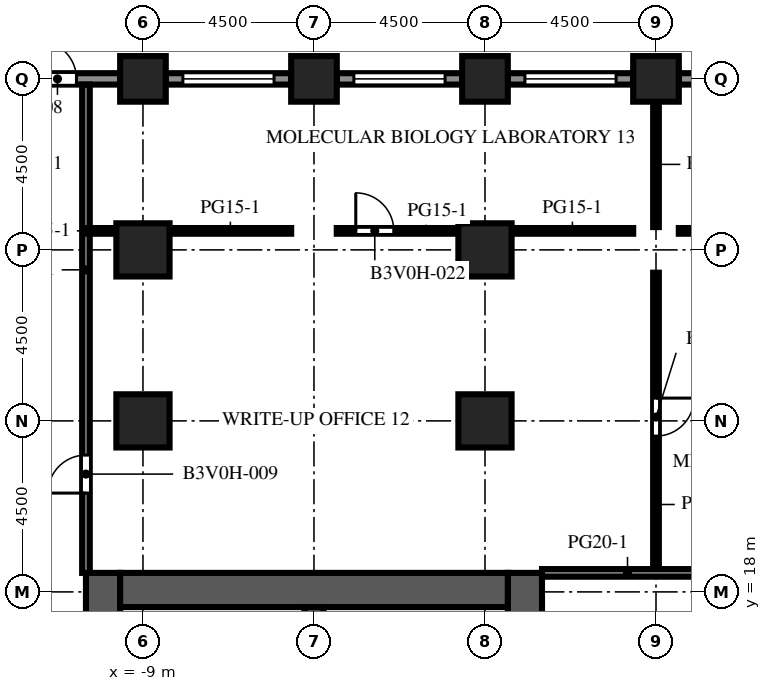
"""IFC4 building model, lengths in metres.
Left out: names, types, materials, properties, quantities, classifications, styles, units other than length and angle.
Written with IfcOpenShell. Run it as: python <this file> out.ifc"""

import sys

from ifc_helpers import new_model, si_unit, direction, frame, frame_2d, origin, origin_2d, place, context, subcontext, project, spatial, rectangle, extrude, element, fill, save


model = new_model("IFC4")
c1 = context("Model", 3, precision=1e-05, world=origin(), true_north=direction((0.0, 1.0)))
c2 = subcontext(c1, "Body", "Model", "MODEL_VIEW")
j1 = project(units=[si_unit("LENGTHUNIT", "METRE"), si_unit("PLANEANGLEUNIT", "RADIAN")], contexts=[c1])
p1 = place(None, origin())
s1 = spatial("IfcSite", under=j1, at=p1, CompositionType="ELEMENT")
p2 = place(p1, origin())
s2 = spatial("IfcBuilding", under=s1, at=p2, CompositionType="ELEMENT")
p3 = place(p2, frame((0.0, 0.0, 82.0)))
s3 = spatial("IfcBuildingStorey", under=s2, at=p3, CompositionType="ELEMENT", Elevation=82.0)
for number, where, z_axis, x_axis in (
    (1, (-9.0, 31.5, -0.45), (0.0, 0.0, 1.0), (1.0, 0.0, 0.0)),
    (2, (-4.5, 31.5, -0.45), (0.0, 0.0, 1.0), (1.0, 0.0, 0.0)),
    (3, (0.0, 31.5, -0.45), (0.0, 0.0, 1.0), (1.0, 0.0, 0.0)),
    (4, (4.5, 31.5, -0.45), (0.0, 0.0, 1.0), (1.0, 0.0, 0.0)),
):
    element("IfcColumn", number, at=place(p3, frame(where, z_axis=z_axis, x_axis=x_axis)), inside=s3, PredefinedType="COLUMN", context=c2, shape_type="SweptSolid", body=[
        extrude(rectangle(XDim=1.2, YDim=1.2, at=origin_2d()), origin(), (0.0, 0.0, 1.0), 4.55),
    ])
for number, where, z_axis, x_axis in (
    (5, (-9.0, 22.5, -0.45), (0.0, 0.0, 1.0), (1.0, 0.0, 0.0)),
    (6, (-9.0, 27.0, -0.45), (0.0, 0.0, 1.0), (1.0, 0.0, 0.0)),
    (7, (0.0, 22.5, -0.45), (0.0, 0.0, 1.0), (1.0, 0.0, 0.0)),
    (8, (0.0, 27.0, -0.45), (0.0, 0.0, 1.0), (1.0, 0.0, 0.0)),
):
    element("IfcColumn", number, at=place(p3, frame(where, z_axis=z_axis, x_axis=x_axis)), inside=s3, PredefinedType="COLUMN", context=c2, shape_type="SweptSolid", body=[
        extrude(rectangle(XDim=1.4, YDim=1.4, at=origin_2d()), origin(), (0.0, 0.0, 1.0), 4.55),
    ])
p4 = place(p3, frame((-10.05, -9.0, 0.0), z_axis=(0.0, 0.0, 1.0), x_axis=(0.0, 1.0, 0.0)))
e9 = element("IfcWall", 9, at=p4, inside=s3, PredefinedType="SHEAR", context=c2, shape_type="SweptSolid", body=[
    extrude(rectangle(XDim=27.5, YDim=0.9, at=frame_2d((13.75, 0.0))), origin(), (0.0, 0.0, 1.0), 4.1),
])
p5 = place(p4, frame((12.55, 0.0, 0.0)))
e10 = element("IfcOpeningElement", 10, at=p5, cuts=e9, PredefinedType="OPENING", context=c2, shape_type="SweptSolid", body=[
    extrude(rectangle(XDim=2.4, YDim=2.4, at=frame_2d((1.2, 1.2))), frame((0.0, 0.46, 0.0), z_axis=(0.0, -1.0, 0.0), x_axis=(1.0, 0.0, 0.0)), (0.0, 0.0, 1.0), 0.92),
])
p6 = place(p4, frame((6.825, 0.0, 0.0)))
e11 = element("IfcOpeningElement", 11, at=p6, cuts=e9, PredefinedType="OPENING", context=c2, shape_type="SweptSolid", body=[
    extrude(rectangle(XDim=1.2, YDim=2.1, at=frame_2d((0.6, 1.05))), frame((0.0, 0.46, 0.0), z_axis=(0.0, -1.0, 0.0), x_axis=(1.0, 0.0, 0.0)), (0.0, 0.0, 1.0), 0.92),
])
p7 = place(p4, frame((19.475, 0.0, 0.0)))
e12 = element("IfcOpeningElement", 12, at=p7, cuts=e9, PredefinedType="OPENING", context=c2, shape_type="SweptSolid", body=[
    extrude(rectangle(XDim=1.2, YDim=2.1, at=frame_2d((0.6, 1.05))), frame((0.0, 0.46, 0.0), z_axis=(0.0, -1.0, 0.0), x_axis=(1.0, 0.0, 0.0)), (0.0, 0.0, 1.0), 0.92),
])
p8 = place(p3, frame((1.05, -9.0, 0.0), z_axis=(0.0, 0.0, 1.0), x_axis=(0.0, 1.0, 0.0)))
e13 = element("IfcWall", 13, at=p8, inside=s3, PredefinedType="SHEAR", context=c2, shape_type="SweptSolid", body=[
    extrude(rectangle(XDim=27.5, YDim=0.9, at=frame_2d((13.75, 0.0))), origin(), (0.0, 0.0, 1.0), 4.1),
])
p9 = place(p8, frame((12.55, 0.0, 0.0)))
e14 = element("IfcOpeningElement", 14, at=p9, cuts=e13, PredefinedType="OPENING", context=c2, shape_type="SweptSolid", body=[
    extrude(rectangle(XDim=2.4, YDim=2.4, at=frame_2d((1.2, 1.2))), frame((0.0, 0.46, 0.0), z_axis=(0.0, -1.0, 0.0), x_axis=(1.0, 0.0, 0.0)), (0.0, 0.0, 1.0), 0.92),
])
p10 = place(p8, frame((5.445, 0.0, 0.0)))
e15 = element("IfcOpeningElement", 15, at=p10, cuts=e13, PredefinedType="OPENING", context=c2, shape_type="SweptSolid", body=[
    extrude(rectangle(XDim=1.2, YDim=2.1, at=frame_2d((0.6, 1.05))), frame((0.0, 0.46, 0.0), z_axis=(0.0, -1.0, 0.0), x_axis=(1.0, 0.0, 0.0)), (0.0, 0.0, 1.0), 0.92),
])
p11 = place(p8, frame((19.485, 0.0, 0.0)))
e16 = element("IfcOpeningElement", 16, at=p11, cuts=e13, PredefinedType="OPENING", context=c2, shape_type="SweptSolid", body=[
    extrude(rectangle(XDim=1.0, YDim=2.1, at=frame_2d((0.5, 1.05))), frame((0.0, 0.46, 0.0), z_axis=(0.0, -1.0, 0.0), x_axis=(1.0, 0.0, 0.0)), (0.0, 0.0, 1.0), 0.92),
])
p12 = place(p8, frame((21.139, 0.0, 0.0)))
e17 = element("IfcOpeningElement", 17, at=p12, cuts=e13, PredefinedType="OPENING", context=c2, shape_type="SweptSolid", body=[
    extrude(rectangle(XDim=1.0, YDim=2.1, at=frame_2d((0.5, 1.05))), frame((0.0, 0.46, 0.0), z_axis=(0.0, -1.0, 0.0), x_axis=(1.0, 0.0, 0.0)), (0.0, 0.0, 1.0), 0.92),
])
p13 = place(p8, frame((23.16, 0.0, 0.0)))
e18 = element("IfcOpeningElement", 18, at=p13, cuts=e13, PredefinedType="OPENING", context=c2, shape_type="SweptSolid", body=[
    extrude(rectangle(XDim=1.0, YDim=2.1, at=frame_2d((0.5, 1.05))), frame((0.0, 0.46, 0.0), z_axis=(0.0, -1.0, 0.0), x_axis=(1.0, 0.0, 0.0)), (0.0, 0.0, 1.0), 0.92),
])
p14 = place(p8, frame((25.181, 0.0, 0.0)))
e19 = element("IfcOpeningElement", 19, at=p14, cuts=e13, PredefinedType="OPENING", context=c2, shape_type="SweptSolid", body=[
    extrude(rectangle(XDim=1.0, YDim=2.1, at=frame_2d((0.5, 1.05))), frame((0.0, 0.46, 0.0), z_axis=(0.0, -1.0, 0.0), x_axis=(1.0, 0.0, 0.0)), (0.0, 0.0, 1.0), 0.92),
])
p15 = place(p3, frame((-9.6, 18.05, 0.0), z_axis=(0.0, 0.0, 1.0), x_axis=(1.0, 0.0, 0.0)))
e20 = element("IfcWall", 20, at=p15, inside=s3, PredefinedType="SHEAR", context=c2, shape_type="SweptSolid", body=[
    extrude(rectangle(XDim=10.2, YDim=0.9, at=frame_2d((5.1, 0.0))), origin(), (0.0, 0.0, 1.0), 4.1),
])
p16 = place(p3, frame((-4.5, 10.25, 0.0), z_axis=(0.0, 0.0, 1.0), x_axis=(0.0, 1.0, 0.0)))
e21 = element("IfcWall", 21, at=p16, inside=s3, PredefinedType="SHEAR", context=c2, shape_type="SweptSolid", body=[
    extrude(rectangle(XDim=7.35, YDim=0.5, at=frame_2d((3.675, 0.0))), origin(), (0.0, 0.0, 1.0), 4.1),
])
p17 = place(p3, frame((5.1, 31.5, 0.0), z_axis=(0.0, 0.0, 1.0), x_axis=(1.0, 0.0, 0.0)))
e22 = element("IfcWall", 22, at=p17, inside=s3, PredefinedType="SOLIDWALL", context=c2, shape_type="SweptSolid", body=[
    extrude(rectangle(XDim=3.3, YDim=0.3, at=frame_2d((1.65, 0.0))), origin(), (0.0, 0.0, 1.0), 2.75),
])
p18 = place(p17, frame((0.45, 0.0, 0.8)))
e23 = element("IfcOpeningElement", 23, at=p18, cuts=e22, PredefinedType="OPENING", context=c2, shape_type="SweptSolid", body=[
    extrude(rectangle(XDim=2.4, YDim=1.7, at=frame_2d((1.2, 0.85))), frame((0.0, 0.16, 0.0), z_axis=(0.0, -1.0, 0.0), x_axis=(1.0, 0.0, 0.0)), (0.0, 0.0, 1.0), 0.32),
])
p19 = place(p3, frame((0.6, 31.5, 0.0), z_axis=(0.0, 0.0, 1.0), x_axis=(1.0, 0.0, 0.0)))
e24 = element("IfcWall", 24, at=p19, inside=s3, PredefinedType="SOLIDWALL", context=c2, shape_type="SweptSolid", body=[
    extrude(rectangle(XDim=3.3, YDim=0.3, at=frame_2d((1.65, 0.0))), origin(), (0.0, 0.0, 1.0), 2.75),
])
p20 = place(p19, frame((0.45, 0.0, 0.8)))
e25 = element("IfcOpeningElement", 25, at=p20, cuts=e24, PredefinedType="OPENING", context=c2, shape_type="SweptSolid", body=[
    extrude(rectangle(XDim=2.4, YDim=1.7, at=frame_2d((1.2, 0.85))), frame((0.0, 0.16, 0.0), z_axis=(0.0, -1.0, 0.0), x_axis=(1.0, 0.0, 0.0)), (0.0, 0.0, 1.0), 0.32),
])
p21 = place(p3, frame((-3.9, 31.5, 0.0), z_axis=(0.0, 0.0, 1.0), x_axis=(1.0, 0.0, 0.0)))
e26 = element("IfcWall", 26, at=p21, inside=s3, PredefinedType="SOLIDWALL", context=c2, shape_type="SweptSolid", body=[
    extrude(rectangle(XDim=3.3, YDim=0.3, at=frame_2d((1.65, 0.0))), origin(), (0.0, 0.0, 1.0), 2.75),
])
p22 = place(p21, frame((0.45, 0.0, 0.8)))
e27 = element("IfcOpeningElement", 27, at=p22, cuts=e26, PredefinedType="OPENING", context=c2, shape_type="SweptSolid", body=[
    extrude(rectangle(XDim=2.4, YDim=1.7, at=frame_2d((1.2, 0.85))), frame((0.0, 0.16, 0.0), z_axis=(0.0, -1.0, 0.0), x_axis=(1.0, 0.0, 0.0)), (0.0, 0.0, 1.0), 0.32),
])
p23 = place(p3, frame((-8.4, 31.5, 0.0), z_axis=(0.0, 0.0, 1.0), x_axis=(1.0, 0.0, 0.0)))
e28 = element("IfcWall", 28, at=p23, inside=s3, PredefinedType="SOLIDWALL", context=c2, shape_type="SweptSolid", body=[
    extrude(rectangle(XDim=3.3, YDim=0.3, at=frame_2d((1.65, 0.0))), origin(), (0.0, 0.0, 1.0), 2.75),
])
p24 = place(p23, frame((0.45, 0.0, 0.8)))
e29 = element("IfcOpeningElement", 29, at=p24, cuts=e28, PredefinedType="OPENING", context=c2, shape_type="SweptSolid", body=[
    extrude(rectangle(XDim=2.4, YDim=1.7, at=frame_2d((1.2, 0.85))), frame((0.0, 0.16, 0.0), z_axis=(0.0, -1.0, 0.0), x_axis=(1.0, 0.0, 0.0)), (0.0, 0.0, 1.0), 0.32),
])
p25 = place(p3, frame((-12.9, 31.5, 0.0), z_axis=(0.0, 0.0, 1.0), x_axis=(1.0, 0.0, 0.0)))
e30 = element("IfcWall", 30, at=p25, inside=s3, PredefinedType="SOLIDWALL", context=c2, shape_type="SweptSolid", body=[
    extrude(rectangle(XDim=3.3, YDim=0.3, at=frame_2d((1.65, 0.0))), origin(), (0.0, 0.0, 1.0), 2.75),
])
p26 = place(p25, frame((1.15, 0.0, 0.0)))
e31 = element("IfcOpeningElement", 31, at=p26, cuts=e30, PredefinedType="OPENING", context=c2, shape_type="SweptSolid", body=[
    extrude(rectangle(XDim=1.0, YDim=2.2, at=frame_2d((0.5, 1.1))), frame((0.0, 0.16, 0.0), z_axis=(0.0, -1.0, 0.0), x_axis=(1.0, 0.0, 0.0)), (0.0, 0.0, 1.0), 0.32),
])
p27 = place(p3, frame((-10.5, 31.35, 0.0), z_axis=(0.0, 0.0, 1.0), x_axis=(0.0, -1.0, 0.0)))
e32 = element("IfcWall", 32, at=p27, inside=s3, PredefinedType="PARTITIONING", context=c2, shape_type="SweptSolid", body=[
    extrude(rectangle(XDim=12.85, YDim=0.2, at=frame_2d((6.425, 0.0))), origin(), (0.0, 0.0, 1.0), 3.65),
])
p28 = place(p27, frame((9.75, 0.0, 0.0)))
e33 = element("IfcOpeningElement", 33, at=p28, cuts=e32, PredefinedType="OPENING", context=c2, shape_type="SweptSolid", body=[
    extrude(rectangle(XDim=1.0, YDim=2.1, at=frame_2d((0.5, 1.05))), frame((0.0, 0.11, 0.0), z_axis=(0.0, -1.0, 0.0), x_axis=(1.0, 0.0, 0.0)), (0.0, 0.0, 1.0), 0.22),
])
p29 = place(p3, frame((4.5, 26.4, 0.0), z_axis=(0.0, 0.0, 1.0), x_axis=(0.0, -1.0, 0.0)))
e34 = element("IfcWall", 34, at=p29, inside=s3, PredefinedType="PARTITIONING", context=c2, shape_type="SweptSolid", body=[
    extrude(rectangle(XDim=7.9, YDim=0.15, at=frame_2d((3.95, 0.0))), origin(), (0.0, 0.0, 1.0), 3.65),
])
p30 = place(p29, frame((3.3, 0.0, 0.0)))
e35 = element("IfcOpeningElement", 35, at=p30, cuts=e34, PredefinedType="OPENING", context=c2, shape_type="SweptSolid", body=[
    extrude(rectangle(XDim=1.0, YDim=2.1, at=frame_2d((0.5, 1.05))), frame((0.0, 0.085, 0.0), z_axis=(0.0, -1.0, 0.0), x_axis=(1.0, 0.0, 0.0)), (0.0, 0.0, 1.0), 0.17),
])
p31 = place(p3, frame((4.5, 27.6, 0.0), z_axis=(0.0, 0.0, 1.0), x_axis=(0.0, 1.0, 0.0)))
e36 = element("IfcWall", 36, at=p31, inside=s3, PredefinedType="PARTITIONING", context=c2, shape_type="SweptSolid", body=[
    extrude(rectangle(XDim=3.3, YDim=0.15, at=frame_2d((1.65, 0.0))), origin(), (0.0, 0.0, 1.0), 3.65),
])
p32 = place(p3, frame((1.5, 18.5, 0.0), z_axis=(0.0, 0.0, 1.0), x_axis=(1.0, 0.0, 0.0)))
e37 = element("IfcWall", 37, at=p32, inside=s3, PredefinedType="PARTITIONING", context=c2, shape_type="SweptSolid", body=[
    extrude(rectangle(XDim=4.5, YDim=0.2, at=frame_2d((2.25, 0.0))), origin(), (0.0, 0.0, 1.0), 3.65),
])
p33 = place(p3, frame((-10.5, 27.5, 0.0), z_axis=(0.0, 0.0, 1.0), x_axis=(1.0, 0.0, 0.0)))
e38 = element("IfcWall", 38, at=p33, inside=s3, PredefinedType="PARTITIONING", context=c2, shape_type="SweptSolid", body=[
    extrude(rectangle(XDim=0.8, YDim=0.15, at=frame_2d((0.4, 0.0))), origin(), (0.0, 0.0, 1.0), 3.65),
])
p34 = place(p3, frame((-8.3, 27.5, 0.0), z_axis=(0.0, 0.0, 1.0), x_axis=(1.0, 0.0, 0.0)))
e39 = element("IfcWall", 39, at=p34, inside=s3, PredefinedType="PARTITIONING", context=c2, shape_type="SweptSolid", body=[
    extrude(rectangle(XDim=3.2, YDim=0.15, at=frame_2d((1.6, 0.0))), origin(), (0.0, 0.0, 1.0), 3.65),
])
p35 = place(p3, frame((-3.9, 27.5, 0.0), z_axis=(0.0, 0.0, 1.0), x_axis=(1.0, 0.0, 0.0)))
e40 = element("IfcWall", 40, at=p35, inside=s3, PredefinedType="PARTITIONING", context=c2, shape_type="SweptSolid", body=[
    extrude(rectangle(XDim=3.2, YDim=0.15, at=frame_2d((1.6, 0.0))), origin(), (0.0, 0.0, 1.0), 3.65),
])
p36 = place(p35, frame((0.5, 0.0, 0.0)))
e41 = element("IfcOpeningElement", 41, at=p36, cuts=e40, PredefinedType="OPENING", context=c2, shape_type="SweptSolid", body=[
    extrude(rectangle(XDim=1.0, YDim=2.1, at=frame_2d((0.5, 1.05))), frame((0.0, 0.085, 0.0), z_axis=(0.0, -1.0, 0.0), x_axis=(1.0, 0.0, 0.0)), (0.0, 0.0, 1.0), 0.17),
])
for number, where, z_axis, x_axis in (
    (42, (0.7, 27.5, 0.0), (0.0, 0.0, 1.0), (1.0, 0.0, 0.0)),
    (43, (5.1, 27.5, 0.0), (0.0, 0.0, 1.0), (1.0, 0.0, 0.0)),
):
    element("IfcWall", number, at=place(p3, frame(where, z_axis=z_axis, x_axis=x_axis)), inside=s3, PredefinedType="PARTITIONING", context=c2, shape_type="SweptSolid", body=[
        extrude(rectangle(XDim=3.2, YDim=0.15, at=frame_2d((1.6, 0.0))), origin(), (0.0, 0.0, 1.0), 3.65),
    ])
p37 = place(p20, origin())
e44 = element("IfcWindow", 44, at=p37, inside=s3, PartitioningType="SINGLE_PANEL", PredefinedType="WINDOW", context=c2, shape_type="SweptSolid", body=[
    extrude(rectangle(XDim=2.4, YDim=1.7, at=frame_2d((1.2, 0.85))), frame((0.0, 0.03, 0.0), z_axis=(0.0, -1.0, 0.0), x_axis=(1.0, 0.0, 0.0)), (0.0, 0.0, 1.0), 0.06),
])
fill(e25, e44)
p38 = place(p22, origin())
e45 = element("IfcWindow", 45, at=p38, inside=s3, PartitioningType="SINGLE_PANEL", PredefinedType="WINDOW", context=c2, shape_type="SweptSolid", body=[
    extrude(rectangle(XDim=2.4, YDim=1.7, at=frame_2d((1.2, 0.85))), frame((0.0, 0.03, 0.0), z_axis=(0.0, -1.0, 0.0), x_axis=(1.0, 0.0, 0.0)), (0.0, 0.0, 1.0), 0.06),
])
fill(e27, e45)
p39 = place(p24, origin())
e46 = element("IfcWindow", 46, at=p39, inside=s3, PartitioningType="SINGLE_PANEL", PredefinedType="WINDOW", context=c2, shape_type="SweptSolid", body=[
    extrude(rectangle(XDim=2.4, YDim=1.7, at=frame_2d((1.2, 0.85))), frame((0.0, 0.03, 0.0), z_axis=(0.0, -1.0, 0.0), x_axis=(1.0, 0.0, 0.0)), (0.0, 0.0, 1.0), 0.06),
])
fill(e29, e46)
p40 = place(p26, origin())
e47 = element("IfcDoor", 47, at=p40, inside=s3, OperationType="SINGLE_SWING_LEFT", PredefinedType="DOOR", context=c2, shape_type="SweptSolid", body=[
    extrude(rectangle(XDim=1.0, YDim=2.2, at=frame_2d((0.5, 1.1))), frame((0.0, 0.025, 0.0), z_axis=(0.0, -1.0, 0.0), x_axis=(1.0, 0.0, 0.0)), (0.0, 0.0, 1.0), 0.05),
])
fill(e31, e47)
p41 = place(p28, origin())
e48 = element("IfcDoor", 48, at=p41, inside=s3, OperationType="SINGLE_SWING_RIGHT", PredefinedType="DOOR", context=c2, shape_type="SweptSolid", body=[
    extrude(rectangle(XDim=1.0, YDim=2.1, at=frame_2d((0.5, 1.05))), frame((0.0, 0.025, 0.0), z_axis=(0.0, -1.0, 0.0), x_axis=(1.0, 0.0, 0.0)), (0.0, 0.0, 1.0), 0.05),
])
fill(e33, e48)
p42 = place(p30, origin())
e49 = element("IfcDoor", 49, at=p42, inside=s3, OperationType="SINGLE_SWING_LEFT", PredefinedType="DOOR", context=c2, shape_type="SweptSolid", body=[
    extrude(rectangle(XDim=1.0, YDim=2.1, at=frame_2d((0.5, 1.05))), frame((0.0, 0.025, 0.0), z_axis=(0.0, -1.0, 0.0), x_axis=(1.0, 0.0, 0.0)), (0.0, 0.0, 1.0), 0.05),
])
fill(e35, e49)
p43 = place(p36, origin())
e50 = element("IfcDoor", 50, at=p43, inside=s3, OperationType="SINGLE_SWING_LEFT", PredefinedType="DOOR", context=c2, shape_type="SweptSolid", body=[
    extrude(rectangle(XDim=1.0, YDim=2.1, at=frame_2d((0.5, 1.05))), frame((0.0, 0.025, 0.0), z_axis=(0.0, -1.0, 0.0), x_axis=(1.0, 0.0, 0.0)), (0.0, 0.0, 1.0), 0.05),
])
fill(e41, e50)
save(model, sys.argv[1])
